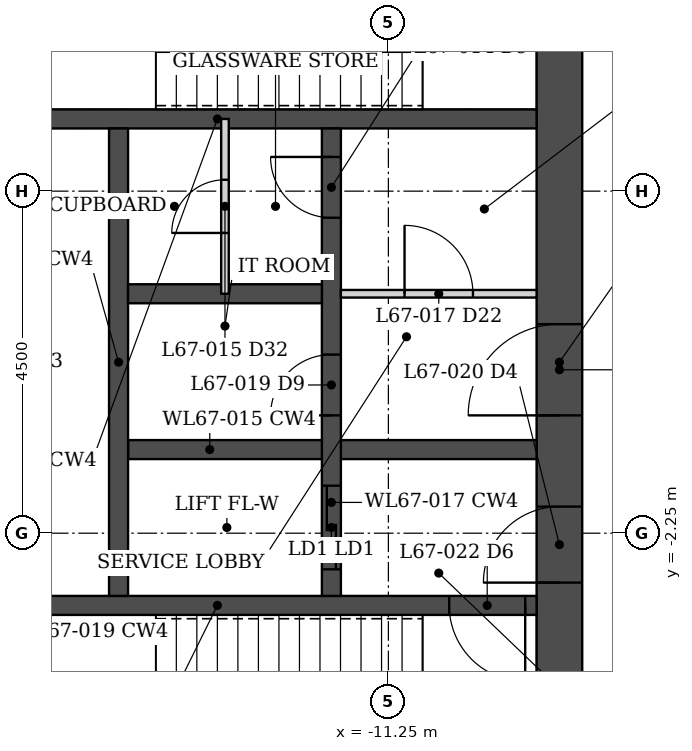
"""IFC4 building model, lengths in metres.
Left out: names, types, materials, properties, quantities, classifications, styles, units other than length and angle.
Written with IfcOpenShell. Run it as: python <this file> out.ifc"""

import sys

from ifc_helpers import new_model, si_unit, direction, frame, frame_2d, origin, place, context, subcontext, project, spatial, rectangle, extrude, element, fill, save


model = new_model("IFC4")
c1 = context("Model", 3, precision=1e-05, world=origin(), true_north=direction((0.0, 1.0)))
c2 = subcontext(c1, "Body", "Model", "MODEL_VIEW")
j1 = project(units=[si_unit("LENGTHUNIT", "METRE"), si_unit("PLANEANGLEUNIT", "RADIAN")], contexts=[c1])
p1 = place(None, origin())
s1 = spatial("IfcSite", under=j1, at=p1, CompositionType="ELEMENT")
p2 = place(p1, origin())
s2 = spatial("IfcBuilding", under=s1, at=p2, CompositionType="ELEMENT")
p3 = place(p2, frame((0.0, 0.0, 257.05)))
s3 = spatial("IfcBuildingStorey", under=s2, at=p3, CompositionType="ELEMENT", Elevation=257.05)
p4 = place(p3, frame((-9.0, -6.45, 0.0), z_axis=(0.0, 0.0, 1.0), x_axis=(0.0, 1.0, 0.0)))
e1 = element("IfcWall", 1, at=p4, inside=s3, PredefinedType="SHEAR", context=c2, shape_type="SweptSolid", body=[
    extrude(rectangle(XDim=12.9, YDim=0.6, at=frame_2d((6.45, 0.0))), origin(), (0.0, 0.0, 1.0), 5.0),
])
p5 = place(p4, frame((3.55, 0.0, 0.0)))
e2 = element("IfcOpeningElement", 2, at=p5, cuts=e1, PredefinedType="OPENING", context=c2, shape_type="SweptSolid", body=[
    extrude(rectangle(XDim=1.0, YDim=2.1, at=frame_2d((0.5, 1.05))), frame((0.0, 0.31, 0.0), z_axis=(0.0, -1.0, 0.0), x_axis=(1.0, 0.0, 0.0)), (0.0, 0.0, 1.0), 0.62),
])
p6 = place(p4, frame((5.75, 0.0, 0.0)))
e3 = element("IfcOpeningElement", 3, at=p6, cuts=e1, PredefinedType="OPENING", context=c2, shape_type="SweptSolid", body=[
    extrude(rectangle(XDim=1.2, YDim=2.1, at=frame_2d((0.6, 1.05))), frame((0.0, 0.31, 0.0), z_axis=(0.0, -1.0, 0.0), x_axis=(1.0, 0.0, 0.0)), (0.0, 0.0, 1.0), 0.62),
])
p7 = place(p4, frame((10.85, 0.0, 0.0)))
e4 = element("IfcOpeningElement", 4, at=p7, cuts=e1, PredefinedType="OPENING", context=c2, shape_type="SweptSolid", body=[
    extrude(rectangle(XDim=1.0, YDim=2.1, at=frame_2d((0.5, 1.05))), frame((0.0, 0.31, 0.0), z_axis=(0.0, -1.0, 0.0), x_axis=(1.0, 0.0, 0.0)), (0.0, 0.0, 1.0), 0.62),
])
p8 = place(p3, frame((-9.3, -3.2, 0.0), z_axis=(0.0, 0.0, 1.0), x_axis=(-1.0, 0.0, 0.0)))
e5 = element("IfcWall", 5, at=p8, inside=s3, PredefinedType="SHEAR", context=c2, shape_type="SweptSolid", body=[
    extrude(rectangle(XDim=8.4, YDim=0.25, at=frame_2d((4.2, 0.0))), origin(), (0.0, 0.0, 1.0), 5.0),
])
p9 = place(p8, frame((0.15, 0.0, 0.0)))
e6 = element("IfcOpeningElement", 6, at=p9, cuts=e5, PredefinedType="OPENING", context=c2, shape_type="SweptSolid", body=[
    extrude(rectangle(XDim=1.0, YDim=2.1, at=frame_2d((0.5, 1.05))), frame((0.0, 0.135, 0.0), z_axis=(0.0, -1.0, 0.0), x_axis=(1.0, 0.0, 0.0)), (0.0, 0.0, 1.0), 0.27),
])
p10 = place(p3, frame((-9.3, 3.2, 0.0), z_axis=(0.0, 0.0, 1.0), x_axis=(-1.0, 0.0, 0.0)))
e7 = element("IfcWall", 7, at=p10, inside=s3, PredefinedType="SHEAR", context=c2, shape_type="SweptSolid", body=[
    extrude(rectangle(XDim=8.4, YDim=0.25, at=frame_2d((4.2, 0.0))), origin(), (0.0, 0.0, 1.0), 5.0),
])
p11 = place(p3, frame((-9.3, -1.15, 0.0), z_axis=(0.0, 0.0, 1.0), x_axis=(-1.0, 0.0, 0.0)))
e8 = element("IfcWall", 8, at=p11, inside=s3, PredefinedType="SHEAR", context=c2, shape_type="SweptSolid", body=[
    extrude(rectangle(XDim=5.375, YDim=0.25, at=frame_2d((2.688, 0.0))), origin(), (0.0, 0.0, 1.0), 5.0),
])
p12 = place(p3, frame((-12.0, -3.075, 0.0), z_axis=(0.0, 0.0, 1.0), x_axis=(0.0, 1.0, 0.0)))
e9 = element("IfcWall", 9, at=p12, inside=s3, PredefinedType="SHEAR", context=c2, shape_type="SweptSolid", body=[
    extrude(rectangle(XDim=6.15, YDim=0.25, at=frame_2d((3.075, 0.0))), origin(), (0.0, 0.0, 1.0), 5.0),
])
p13 = place(p12, frame((2.375, 0.0, 0.0)))
e10 = element("IfcOpeningElement", 10, at=p13, cuts=e9, PredefinedType="OPENING", context=c2, shape_type="SweptSolid", body=[
    extrude(rectangle(XDim=0.8, YDim=2.1, at=frame_2d((0.4, 1.05))), frame((0.0, 0.135, 0.0), z_axis=(0.0, -1.0, 0.0), x_axis=(1.0, 0.0, 0.0)), (0.0, 0.0, 1.0), 0.27),
])
p14 = place(p12, frame((4.975, 0.0, 0.0)))
e11 = element("IfcOpeningElement", 11, at=p14, cuts=e9, PredefinedType="OPENING", context=c2, shape_type="SweptSolid", body=[
    extrude(rectangle(XDim=0.8, YDim=2.1, at=frame_2d((0.4, 1.05))), frame((0.0, 0.135, 0.0), z_axis=(0.0, -1.0, 0.0), x_axis=(1.0, 0.0, 0.0)), (0.0, 0.0, 1.0), 0.27),
])
p15 = place(p12, frame((0.35, 0.0, 0.0)))
e12 = element("IfcOpeningElement", 12, at=p15, cuts=e9, PredefinedType="OPENING", context=c2, shape_type="SweptSolid", body=[
    extrude(rectangle(XDim=1.1, YDim=2.1, at=frame_2d((0.55, 1.05))), frame((0.0, 0.135, 0.0), z_axis=(0.0, -1.0, 0.0), x_axis=(1.0, 0.0, 0.0)), (0.0, 0.0, 1.0), 0.27),
])
p16 = place(p3, frame((-14.8, -3.075, 0.0), z_axis=(0.0, 0.0, 1.0), x_axis=(0.0, 1.0, 0.0)))
e13 = element("IfcWall", 13, at=p16, inside=s3, PredefinedType="SHEAR", context=c2, shape_type="SweptSolid", body=[
    extrude(rectangle(XDim=6.15, YDim=0.25, at=frame_2d((3.075, 0.0))), origin(), (0.0, 0.0, 1.0), 5.0),
])
p17 = place(p3, frame((-12.125, 0.9, 0.0), z_axis=(0.0, 0.0, 1.0), x_axis=(-1.0, 0.0, 0.0)))
e14 = element("IfcWall", 14, at=p17, inside=s3, PredefinedType="SHEAR", context=c2, shape_type="SweptSolid", body=[
    extrude(rectangle(XDim=2.55, YDim=0.25, at=frame_2d((1.275, 0.0))), origin(), (0.0, 0.0, 1.0), 5.0),
])
p18 = place(p3, frame((-11.875, 0.9, 0.0), z_axis=(0.0, 0.0, 1.0), x_axis=(1.0, 0.0, 0.0)))
e15 = element("IfcWall", 15, at=p18, inside=s3, PredefinedType="PARTITIONING", context=c2, shape_type="SweptSolid", body=[
    extrude(rectangle(XDim=2.575, YDim=0.1, at=frame_2d((1.288, 0.0))), origin(), (0.0, 0.0, 1.0), 3.823),
])
p19 = place(p18, frame((0.837, 0.0, 0.0)))
e16 = element("IfcOpeningElement", 16, at=p19, cuts=e15, PredefinedType="OPENING", context=c2, shape_type="SweptSolid", body=[
    extrude(rectangle(XDim=0.9, YDim=2.1, at=frame_2d((0.45, 1.05))), frame((0.0, 0.06, 0.0), z_axis=(0.0, -1.0, 0.0), x_axis=(1.0, 0.0, 0.0)), (0.0, 0.0, 1.0), 0.12),
])
p20 = place(p3, frame((-13.4, 0.9, 0.0), z_axis=(0.0, 0.0, 1.0), x_axis=(0.0, 1.0, 0.0)))
e17 = element("IfcWall", 17, at=p20, inside=s3, PredefinedType="PARTITIONING", context=c2, shape_type="SweptSolid", body=[
    extrude(rectangle(XDim=2.3, YDim=0.1, at=frame_2d((1.15, 0.0))), origin(), (0.0, 0.0, 1.0), 3.823),
])
p21 = place(p20, frame((0.8, 0.0, 0.0)))
e18 = element("IfcOpeningElement", 18, at=p21, cuts=e17, PredefinedType="OPENING", context=c2, shape_type="SweptSolid", body=[
    extrude(rectangle(XDim=0.7, YDim=2.1, at=frame_2d((0.35, 1.05))), frame((0.0, 0.06, 0.0), z_axis=(0.0, -1.0, 0.0), x_axis=(1.0, 0.0, 0.0)), (0.0, 0.0, 1.0), 0.12),
])
p22 = place(p5, origin())
e19 = element("IfcDoor", 19, at=p22, inside=s3, OperationType="SINGLE_SWING_LEFT", PredefinedType="DOOR", context=c2, shape_type="SweptSolid", body=[
    extrude(rectangle(XDim=1.0, YDim=2.1, at=frame_2d((0.5, 1.05))), frame((0.0, 0.025, 0.0), z_axis=(0.0, -1.0, 0.0), x_axis=(1.0, 0.0, 0.0)), (0.0, 0.0, 1.0), 0.05),
])
fill(e2, e19)
p23 = place(p9, origin())
e20 = element("IfcDoor", 20, at=p23, inside=s3, OperationType="SINGLE_SWING_LEFT", PredefinedType="DOOR", context=c2, shape_type="SweptSolid", body=[
    extrude(rectangle(XDim=1.0, YDim=2.1, at=frame_2d((0.5, 1.05))), frame((0.0, 0.025, 0.0), z_axis=(0.0, -1.0, 0.0), x_axis=(1.0, 0.0, 0.0)), (0.0, 0.0, 1.0), 0.05),
])
fill(e6, e20)
p24 = place(p19, origin())
e21 = element("IfcDoor", 21, at=p24, inside=s3, OperationType="SINGLE_SWING_LEFT", PredefinedType="DOOR", context=c2, shape_type="SweptSolid", body=[
    extrude(rectangle(XDim=0.9, YDim=2.1, at=frame_2d((0.45, 1.05))), frame((0.0, 0.025, 0.0), z_axis=(0.0, -1.0, 0.0), x_axis=(1.0, 0.0, 0.0)), (0.0, 0.0, 1.0), 0.05),
])
fill(e16, e21)
p25 = place(p6, origin())
e22 = element("IfcDoor", 22, at=p25, inside=s3, OperationType="SINGLE_SWING_LEFT", PredefinedType="DOOR", context=c2, shape_type="SweptSolid", body=[
    extrude(rectangle(XDim=1.2, YDim=2.1, at=frame_2d((0.6, 1.05))), frame((0.0, 0.025, 0.0), z_axis=(0.0, -1.0, 0.0), x_axis=(1.0, 0.0, 0.0)), (0.0, 0.0, 1.0), 0.05),
])
fill(e3, e22)
p26 = place(p13, origin())
e23 = element("IfcDoor", 23, at=p26, inside=s3, OperationType="SINGLE_SWING_LEFT", PredefinedType="DOOR", context=c2, shape_type="SweptSolid", body=[
    extrude(rectangle(XDim=0.8, YDim=2.1, at=frame_2d((0.4, 1.05))), frame((0.0, 0.025, 0.0), z_axis=(0.0, -1.0, 0.0), x_axis=(1.0, 0.0, 0.0)), (0.0, 0.0, 1.0), 0.05),
])
fill(e10, e23)
p27 = place(p21, origin())
e24 = element("IfcDoor", 24, at=p27, inside=s3, OperationType="SINGLE_SWING_LEFT", PredefinedType="DOOR", context=c2, shape_type="SweptSolid", body=[
    extrude(rectangle(XDim=0.7, YDim=2.1, at=frame_2d((0.35, 1.05))), frame((0.0, 0.025, 0.0), z_axis=(0.0, -1.0, 0.0), x_axis=(1.0, 0.0, 0.0)), (0.0, 0.0, 1.0), 0.05),
])
fill(e18, e24)
p28 = place(p14, origin())
e25 = element("IfcDoor", 25, at=p28, inside=s3, OperationType="SINGLE_SWING_RIGHT", PredefinedType="DOOR", context=c2, shape_type="SweptSolid", body=[
    extrude(rectangle(XDim=0.8, YDim=2.1, at=frame_2d((0.4, 1.05))), frame((0.0, 0.025, 0.0), z_axis=(0.0, -1.0, 0.0), x_axis=(1.0, 0.0, 0.0)), (0.0, 0.0, 1.0), 0.05),
])
fill(e11, e25)
p29 = place(p15, origin())
e26 = element("IfcDoor", 26, at=p29, inside=s3, OperationType="DOUBLE_DOOR_SLIDING", PredefinedType="DOOR", context=c2, shape_type="SweptSolid", body=[
    extrude(rectangle(XDim=1.1, YDim=2.1, at=frame_2d((0.55, 1.05))), frame((0.0, 0.025, 0.0), z_axis=(0.0, -1.0, 0.0), x_axis=(1.0, 0.0, 0.0)), (0.0, 0.0, 1.0), 0.05),
])
fill(e12, e26)
save(model, sys.argv[1])
